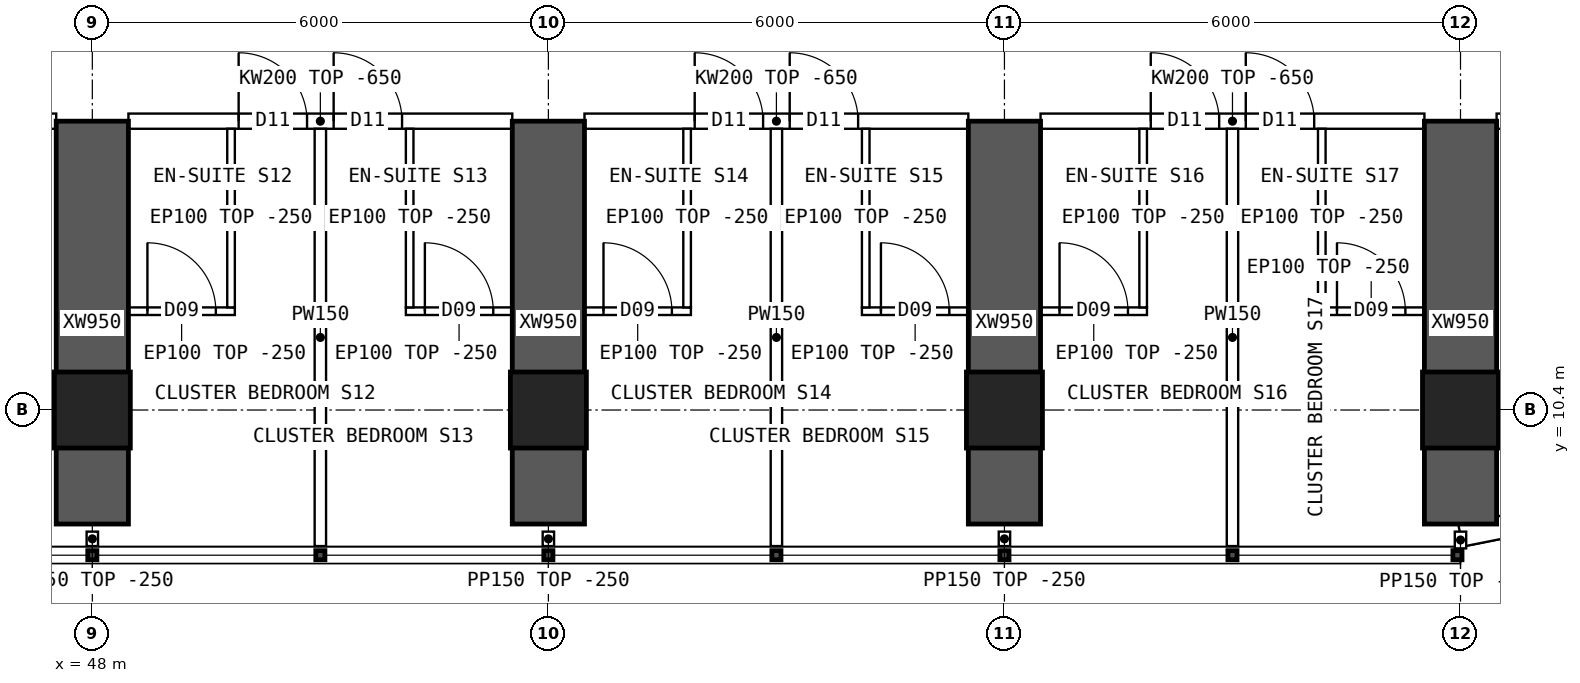
"""IFC4 building model, lengths in metres.
Left out: names, types, materials, properties, quantities, classifications, styles, units other than length and angle.
Written with IfcOpenShell. Run it as: python <this file> out.ifc"""

import sys

from ifc_helpers import new_model, si_unit, direction, frame, frame_2d, origin, origin_2d, place, context, subcontext, project, spatial, polyline, rectangle, hollow_rectangle, outline, extrude, element, fill, save


model = new_model("IFC4")
c1 = context("Model", 3, precision=1e-05, world=origin(), true_north=direction((0.0, 1.0)))
c2 = subcontext(c1, "Body", "Model", "MODEL_VIEW")
j1 = project(units=[si_unit("LENGTHUNIT", "METRE"), si_unit("PLANEANGLEUNIT", "RADIAN")], contexts=[c1])
p1 = place(None, origin())
s1 = spatial("IfcSite", under=j1, at=p1, CompositionType="ELEMENT")
p2 = place(p1, origin())
s2 = spatial("IfcBuilding", under=s1, at=p2, CompositionType="ELEMENT")
p3 = place(p2, frame((0.0, 0.0, 84.4)))
s3 = spatial("IfcBuildingStorey", under=s2, at=p3, CompositionType="ELEMENT", Elevation=84.4)
for number, where, z_axis, x_axis in (
    (1, (48.0, 10.4, 0.0), (0.0, 0.0, 1.0), (1.0, 0.0, 0.0)),
    (2, (54.0, 10.4, 0.0), (0.0, 0.0, 1.0), (1.0, 0.0, 0.0)),
    (3, (60.0, 10.4, 0.0), (0.0, 0.0, 1.0), (1.0, 0.0, 0.0)),
    (4, (66.0, 10.4, 0.0), (0.0, 0.0, 1.0), (1.0, 0.0, 0.0)),
):
    element("IfcColumn", number, at=place(p3, frame(where, z_axis=z_axis, x_axis=x_axis)), inside=s3, PredefinedType="COLUMN", context=c2, shape_type="SweptSolid", body=[
        extrude(hollow_rectangle(XDim=1.0, YDim=1.0, WallThickness=0.1, at=origin_2d()), origin(), (0.0, 0.0, 1.0), 3.75),
    ])
for number, where, z_axis, x_axis in (
    (5, (48.0, 8.9, 0.0), (0.0, 0.0, 1.0), (0.0, 1.0, 0.0)),
    (6, (54.0, 8.9, 0.0), (0.0, 0.0, 1.0), (0.0, 1.0, 0.0)),
    (7, (60.0, 8.9, 0.0), (0.0, 0.0, 1.0), (0.0, 1.0, 0.0)),
    (8, (66.0, 8.9, 0.0), (0.0, 0.0, 1.0), (0.0, 1.0, 0.0)),
):
    element("IfcWall", number, at=place(p3, frame(where, z_axis=z_axis, x_axis=x_axis)), inside=s3, PredefinedType="SHEAR", context=c2, shape_type="SweptSolid", body=[
        extrude(rectangle(XDim=5.3, YDim=0.95, at=frame_2d((2.65, 0.0))), origin(), (0.0, 0.0, 1.0), 3.75),
    ])
p4 = place(p3, frame((66.0, 8.75, 0.0), z_axis=(0.0, 0.0, 1.0), x_axis=(0.980791473772, 0.195059183267, 0.0)))
e9 = element("IfcWall", 9, at=p4, inside=s3, PredefinedType="SOLIDWALL", context=c2, shape_type="SweptSolid", body=[
    extrude(outline(polyline([(-0.03, -0.15), (3.717, -0.15), (3.657, 0.15), (0.03, 0.15), (-0.03, -0.15)])), origin(), (0.0, 0.0, 1.0), 3.5),
])
p5 = place(p4, frame((1.144, 0.0, 0.9)))
e10 = element("IfcOpeningElement", 10, at=p5, cuts=e9, PredefinedType="OPENING", context=c2, shape_type="SweptSolid", body=[
    extrude(rectangle(XDim=1.4, YDim=1.8, at=frame_2d((0.7, 0.9))), frame((0.0, 0.16, 0.0), z_axis=(0.0, -1.0, 0.0), x_axis=(1.0, 0.0, 0.0)), (0.0, 0.0, 1.0), 0.32),
])
p6 = place(p3, frame((42.475, 14.2, 0.0), z_axis=(0.0, 0.0, 1.0), x_axis=(1.0, 0.0, 0.0)))
e11 = element("IfcWall", 11, at=p6, inside=s3, PredefinedType="SOLIDWALL", context=c2, shape_type="SweptSolid", body=[
    extrude(outline(polyline([(0.0, 0.0), (5.05, 0.0), (5.05, 3.1), (0.0, 3.1), (0.0, 0.0)])), frame((0.0, 0.1, 0.0), z_axis=(0.0, -1.0, 0.0), x_axis=(1.0, 0.0, 0.0)), (0.0, 0.0, 1.0), 0.2),
])
p7 = place(p6, frame((0.6, 0.0, 0.0)))
e12 = element("IfcOpeningElement", 12, at=p7, cuts=e11, PredefinedType="OPENING", context=c2, shape_type="SweptSolid", body=[
    extrude(rectangle(XDim=1.0, YDim=2.1, at=frame_2d((0.5, 1.05))), frame((0.0, 0.11, 0.0), z_axis=(0.0, -1.0, 0.0), x_axis=(1.0, 0.0, 0.0)), (0.0, 0.0, 1.0), 0.22),
])
p8 = place(p3, frame((48.475, 14.2, 0.0), z_axis=(0.0, 0.0, 1.0), x_axis=(1.0, 0.0, 0.0)))
e13 = element("IfcWall", 13, at=p8, inside=s3, PredefinedType="SOLIDWALL", context=c2, shape_type="SweptSolid", body=[
    extrude(outline(polyline([(0.0, 0.0), (5.05, 0.0), (5.05, 3.1), (0.0, 3.1), (0.0, 0.0)])), frame((0.0, 0.1, 0.0), z_axis=(0.0, -1.0, 0.0), x_axis=(1.0, 0.0, 0.0)), (0.0, 0.0, 1.0), 0.2),
])
p9 = place(p8, frame((1.45, 0.0, 0.0)))
e14 = element("IfcOpeningElement", 14, at=p9, cuts=e13, PredefinedType="OPENING", context=c2, shape_type="SweptSolid", body=[
    extrude(rectangle(XDim=0.9, YDim=2.1, at=frame_2d((0.45, 1.05))), frame((0.0, 0.11, 0.0), z_axis=(0.0, -1.0, 0.0), x_axis=(1.0, 0.0, 0.0)), (0.0, 0.0, 1.0), 0.22),
])
p10 = place(p8, frame((2.7, 0.0, 0.0)))
e15 = element("IfcOpeningElement", 15, at=p10, cuts=e13, PredefinedType="OPENING", context=c2, shape_type="SweptSolid", body=[
    extrude(rectangle(XDim=0.9, YDim=2.1, at=frame_2d((0.45, 1.05))), frame((0.0, 0.11, 0.0), z_axis=(0.0, -1.0, 0.0), x_axis=(1.0, 0.0, 0.0)), (0.0, 0.0, 1.0), 0.22),
])
p11 = place(p3, frame((54.475, 14.2, 0.0), z_axis=(0.0, 0.0, 1.0), x_axis=(1.0, 0.0, 0.0)))
e16 = element("IfcWall", 16, at=p11, inside=s3, PredefinedType="SOLIDWALL", context=c2, shape_type="SweptSolid", body=[
    extrude(outline(polyline([(0.0, 0.0), (5.05, 0.0), (5.05, 3.1), (0.0, 3.1), (0.0, 0.0)])), frame((0.0, 0.1, 0.0), z_axis=(0.0, -1.0, 0.0), x_axis=(1.0, 0.0, 0.0)), (0.0, 0.0, 1.0), 0.2),
])
p12 = place(p11, frame((1.45, 0.0, 0.0)))
e17 = element("IfcOpeningElement", 17, at=p12, cuts=e16, PredefinedType="OPENING", context=c2, shape_type="SweptSolid", body=[
    extrude(rectangle(XDim=0.9, YDim=2.1, at=frame_2d((0.45, 1.05))), frame((0.0, 0.11, 0.0), z_axis=(0.0, -1.0, 0.0), x_axis=(1.0, 0.0, 0.0)), (0.0, 0.0, 1.0), 0.22),
])
p13 = place(p11, frame((2.7, 0.0, 0.0)))
e18 = element("IfcOpeningElement", 18, at=p13, cuts=e16, PredefinedType="OPENING", context=c2, shape_type="SweptSolid", body=[
    extrude(rectangle(XDim=0.9, YDim=2.1, at=frame_2d((0.45, 1.05))), frame((0.0, 0.11, 0.0), z_axis=(0.0, -1.0, 0.0), x_axis=(1.0, 0.0, 0.0)), (0.0, 0.0, 1.0), 0.22),
])
p14 = place(p3, frame((60.475, 14.2, 0.0), z_axis=(0.0, 0.0, 1.0), x_axis=(1.0, 0.0, 0.0)))
e19 = element("IfcWall", 19, at=p14, inside=s3, PredefinedType="SOLIDWALL", context=c2, shape_type="SweptSolid", body=[
    extrude(outline(polyline([(0.0, 0.0), (5.05, 0.0), (5.05, 3.1), (0.0, 3.1), (0.0, 0.0)])), frame((0.0, 0.1, 0.0), z_axis=(0.0, -1.0, 0.0), x_axis=(1.0, 0.0, 0.0)), (0.0, 0.0, 1.0), 0.2),
])
p15 = place(p14, frame((1.45, 0.0, 0.0)))
e20 = element("IfcOpeningElement", 20, at=p15, cuts=e19, PredefinedType="OPENING", context=c2, shape_type="SweptSolid", body=[
    extrude(rectangle(XDim=0.9, YDim=2.1, at=frame_2d((0.45, 1.05))), frame((0.0, 0.11, 0.0), z_axis=(0.0, -1.0, 0.0), x_axis=(1.0, 0.0, 0.0)), (0.0, 0.0, 1.0), 0.22),
])
p16 = place(p14, frame((2.7, 0.0, 0.0)))
e21 = element("IfcOpeningElement", 21, at=p16, cuts=e19, PredefinedType="OPENING", context=c2, shape_type="SweptSolid", body=[
    extrude(rectangle(XDim=0.9, YDim=2.1, at=frame_2d((0.45, 1.05))), frame((0.0, 0.11, 0.0), z_axis=(0.0, -1.0, 0.0), x_axis=(1.0, 0.0, 0.0)), (0.0, 0.0, 1.0), 0.22),
])
p17 = place(p3, frame((66.475, 14.2, 0.0), z_axis=(0.0, 0.0, 1.0), x_axis=(1.0, 0.0, 0.0)))
e22 = element("IfcWall", 22, at=p17, inside=s3, PredefinedType="SOLIDWALL", context=c2, shape_type="SweptSolid", body=[
    extrude(rectangle(XDim=1.925, YDim=0.2, at=frame_2d((0.962, 0.0))), origin(), (0.0, 0.0, 1.0), 3.5),
])
p18 = place(p17, frame((0.2, 0.0, 0.0)))
e23 = element("IfcOpeningElement", 23, at=p18, cuts=e22, PredefinedType="OPENING", context=c2, shape_type="SweptSolid", body=[
    extrude(rectangle(XDim=0.9, YDim=2.1, at=frame_2d((0.45, 1.05))), frame((0.0, 0.11, 0.0), z_axis=(0.0, -1.0, 0.0), x_axis=(1.0, 0.0, 0.0)), (0.0, 0.0, 1.0), 0.22),
])
p19 = place(p3, frame((51.0, 8.61, 0.0), z_axis=(0.0, 0.0, 1.0), x_axis=(0.0, 1.0, 0.0)))
e24 = element("IfcWall", 24, at=p19, inside=s3, PredefinedType="PARTITIONING", context=c2, shape_type="SweptSolid", body=[
    extrude(outline(polyline([(0.0, 0.0), (5.49, 0.0), (5.49, 3.1), (5.442, 3.1), (5.44, 3.5), (1.992, 3.5), (1.99, 3.1), (1.592, 3.1), (1.59, 3.5), (0.0, 3.5), (0.0, 0.0)])), frame((0.0, 0.075, 0.0), z_axis=(0.0, -1.0, 0.0), x_axis=(1.0, 0.0, 0.0)), (0.0, 0.0, 1.0), 0.15),
])
p20 = place(p3, frame((49.875, 11.7, 0.0), z_axis=(0.0, 0.0, 1.0), x_axis=(-1.0, 0.0, 0.0)))
e25 = element("IfcWall", 25, at=p20, inside=s3, PredefinedType="PARTITIONING", context=c2, shape_type="SweptSolid", body=[
    extrude(rectangle(XDim=1.4, YDim=0.1, at=frame_2d((0.7, 0.0))), origin(), (0.0, 0.0, 1.0), 3.5),
])
p21 = place(p20, frame((0.25, 0.0, 0.0)))
e26 = element("IfcOpeningElement", 26, at=p21, cuts=e25, PredefinedType="OPENING", context=c2, shape_type="SweptSolid", body=[
    extrude(rectangle(XDim=0.9, YDim=2.1, at=frame_2d((0.45, 1.05))), frame((0.0, 0.06, 0.0), z_axis=(0.0, -1.0, 0.0), x_axis=(1.0, 0.0, 0.0)), (0.0, 0.0, 1.0), 0.12),
])
p22 = place(p3, frame((49.825, 11.75, 0.0), z_axis=(0.0, 0.0, 1.0), x_axis=(0.0, 1.0, 0.0)))
e27 = element("IfcWall", 27, at=p22, inside=s3, PredefinedType="PARTITIONING", context=c2, shape_type="SweptSolid", body=[
    extrude(outline(polyline([(0.0, 0.0), (2.35, 0.0), (2.35, 3.1), (2.302, 3.1), (2.3, 3.5), (0.0, 3.5), (0.0, 0.0)])), frame((0.0, 0.05, 0.0), z_axis=(0.0, -1.0, 0.0), x_axis=(1.0, 0.0, 0.0)), (0.0, 0.0, 1.0), 0.1),
])
p23 = place(p3, frame((53.525, 11.7, 0.0), z_axis=(0.0, 0.0, 1.0), x_axis=(-1.0, 0.0, 0.0)))
e28 = element("IfcWall", 28, at=p23, inside=s3, PredefinedType="PARTITIONING", context=c2, shape_type="SweptSolid", body=[
    extrude(rectangle(XDim=1.4, YDim=0.1, at=frame_2d((0.7, 0.0))), origin(), (0.0, 0.0, 1.0), 3.5),
])
p24 = place(p23, frame((0.25, 0.0, 0.0)))
e29 = element("IfcOpeningElement", 29, at=p24, cuts=e28, PredefinedType="OPENING", context=c2, shape_type="SweptSolid", body=[
    extrude(rectangle(XDim=0.9, YDim=2.1, at=frame_2d((0.45, 1.05))), frame((0.0, 0.06, 0.0), z_axis=(0.0, -1.0, 0.0), x_axis=(1.0, 0.0, 0.0)), (0.0, 0.0, 1.0), 0.12),
])
p25 = place(p3, frame((52.175, 11.75, 0.0), z_axis=(0.0, 0.0, 1.0), x_axis=(0.0, 1.0, 0.0)))
e30 = element("IfcWall", 30, at=p25, inside=s3, PredefinedType="PARTITIONING", context=c2, shape_type="SweptSolid", body=[
    extrude(outline(polyline([(0.0, 0.0), (2.35, 0.0), (2.35, 3.1), (2.302, 3.1), (2.3, 3.5), (0.0, 3.5), (0.0, 0.0)])), frame((0.0, 0.05, 0.0), z_axis=(0.0, -1.0, 0.0), x_axis=(1.0, 0.0, 0.0)), (0.0, 0.0, 1.0), 0.1),
])
p26 = place(p3, frame((57.0, 8.61, 0.0), z_axis=(0.0, 0.0, 1.0), x_axis=(0.0, 1.0, 0.0)))
e31 = element("IfcWall", 31, at=p26, inside=s3, PredefinedType="PARTITIONING", context=c2, shape_type="SweptSolid", body=[
    extrude(outline(polyline([(0.0, 0.0), (5.49, 0.0), (5.49, 3.1), (5.442, 3.1), (5.44, 3.5), (1.992, 3.5), (1.99, 3.1), (1.592, 3.1), (1.59, 3.5), (0.0, 3.5), (0.0, 0.0)])), frame((0.0, 0.075, 0.0), z_axis=(0.0, -1.0, 0.0), x_axis=(1.0, 0.0, 0.0)), (0.0, 0.0, 1.0), 0.15),
])
p27 = place(p3, frame((55.875, 11.7, 0.0), z_axis=(0.0, 0.0, 1.0), x_axis=(-1.0, 0.0, 0.0)))
e32 = element("IfcWall", 32, at=p27, inside=s3, PredefinedType="PARTITIONING", context=c2, shape_type="SweptSolid", body=[
    extrude(rectangle(XDim=1.4, YDim=0.1, at=frame_2d((0.7, 0.0))), origin(), (0.0, 0.0, 1.0), 3.5),
])
p28 = place(p27, frame((0.25, 0.0, 0.0)))
e33 = element("IfcOpeningElement", 33, at=p28, cuts=e32, PredefinedType="OPENING", context=c2, shape_type="SweptSolid", body=[
    extrude(rectangle(XDim=0.9, YDim=2.1, at=frame_2d((0.45, 1.05))), frame((0.0, 0.06, 0.0), z_axis=(0.0, -1.0, 0.0), x_axis=(1.0, 0.0, 0.0)), (0.0, 0.0, 1.0), 0.12),
])
p29 = place(p3, frame((55.825, 11.75, 0.0), z_axis=(0.0, 0.0, 1.0), x_axis=(0.0, 1.0, 0.0)))
e34 = element("IfcWall", 34, at=p29, inside=s3, PredefinedType="PARTITIONING", context=c2, shape_type="SweptSolid", body=[
    extrude(outline(polyline([(0.0, 0.0), (2.35, 0.0), (2.35, 3.1), (2.302, 3.1), (2.3, 3.5), (0.0, 3.5), (0.0, 0.0)])), frame((0.0, 0.05, 0.0), z_axis=(0.0, -1.0, 0.0), x_axis=(1.0, 0.0, 0.0)), (0.0, 0.0, 1.0), 0.1),
])
p30 = place(p3, frame((59.525, 11.7, 0.0), z_axis=(0.0, 0.0, 1.0), x_axis=(-1.0, 0.0, 0.0)))
e35 = element("IfcWall", 35, at=p30, inside=s3, PredefinedType="PARTITIONING", context=c2, shape_type="SweptSolid", body=[
    extrude(rectangle(XDim=1.4, YDim=0.1, at=frame_2d((0.7, 0.0))), origin(), (0.0, 0.0, 1.0), 3.5),
])
p31 = place(p30, frame((0.25, 0.0, 0.0)))
e36 = element("IfcOpeningElement", 36, at=p31, cuts=e35, PredefinedType="OPENING", context=c2, shape_type="SweptSolid", body=[
    extrude(rectangle(XDim=0.9, YDim=2.1, at=frame_2d((0.45, 1.05))), frame((0.0, 0.06, 0.0), z_axis=(0.0, -1.0, 0.0), x_axis=(1.0, 0.0, 0.0)), (0.0, 0.0, 1.0), 0.12),
])
p32 = place(p3, frame((58.175, 11.75, 0.0), z_axis=(0.0, 0.0, 1.0), x_axis=(0.0, 1.0, 0.0)))
e37 = element("IfcWall", 37, at=p32, inside=s3, PredefinedType="PARTITIONING", context=c2, shape_type="SweptSolid", body=[
    extrude(outline(polyline([(0.0, 0.0), (2.35, 0.0), (2.35, 3.1), (2.302, 3.1), (2.3, 3.5), (0.0, 3.5), (0.0, 0.0)])), frame((0.0, 0.05, 0.0), z_axis=(0.0, -1.0, 0.0), x_axis=(1.0, 0.0, 0.0)), (0.0, 0.0, 1.0), 0.1),
])
p33 = place(p3, frame((63.0, 8.61, 0.0), z_axis=(0.0, 0.0, 1.0), x_axis=(0.0, 1.0, 0.0)))
e38 = element("IfcWall", 38, at=p33, inside=s3, PredefinedType="PARTITIONING", context=c2, shape_type="SweptSolid", body=[
    extrude(outline(polyline([(0.0, 0.0), (5.49, 0.0), (5.49, 3.1), (5.442, 3.1), (5.44, 3.5), (1.992, 3.5), (1.99, 3.1), (1.592, 3.1), (1.59, 3.5), (0.0, 3.5), (0.0, 0.0)])), frame((0.0, 0.075, 0.0), z_axis=(0.0, -1.0, 0.0), x_axis=(1.0, 0.0, 0.0)), (0.0, 0.0, 1.0), 0.15),
])
p34 = place(p3, frame((61.875, 11.7, 0.0), z_axis=(0.0, 0.0, 1.0), x_axis=(-1.0, 0.0, 0.0)))
e39 = element("IfcWall", 39, at=p34, inside=s3, PredefinedType="PARTITIONING", context=c2, shape_type="SweptSolid", body=[
    extrude(rectangle(XDim=1.4, YDim=0.1, at=frame_2d((0.7, 0.0))), origin(), (0.0, 0.0, 1.0), 3.5),
])
p35 = place(p34, frame((0.25, 0.0, 0.0)))
e40 = element("IfcOpeningElement", 40, at=p35, cuts=e39, PredefinedType="OPENING", context=c2, shape_type="SweptSolid", body=[
    extrude(rectangle(XDim=0.9, YDim=2.1, at=frame_2d((0.45, 1.05))), frame((0.0, 0.06, 0.0), z_axis=(0.0, -1.0, 0.0), x_axis=(1.0, 0.0, 0.0)), (0.0, 0.0, 1.0), 0.12),
])
p36 = place(p3, frame((61.825, 11.75, 0.0), z_axis=(0.0, 0.0, 1.0), x_axis=(0.0, 1.0, 0.0)))
e41 = element("IfcWall", 41, at=p36, inside=s3, PredefinedType="PARTITIONING", context=c2, shape_type="SweptSolid", body=[
    extrude(outline(polyline([(0.0, 0.0), (2.35, 0.0), (2.35, 3.1), (2.302, 3.1), (2.3, 3.5), (0.0, 3.5), (0.0, 0.0)])), frame((0.0, 0.05, 0.0), z_axis=(0.0, -1.0, 0.0), x_axis=(1.0, 0.0, 0.0)), (0.0, 0.0, 1.0), 0.1),
])
p37 = place(p3, frame((65.525, 11.7, 0.0), z_axis=(0.0, 0.0, 1.0), x_axis=(-1.0, 0.0, 0.0)))
e42 = element("IfcWall", 42, at=p37, inside=s3, PredefinedType="PARTITIONING", context=c2, shape_type="SweptSolid", body=[
    extrude(rectangle(XDim=1.4, YDim=0.1, at=frame_2d((0.7, 0.0))), origin(), (0.0, 0.0, 1.0), 3.5),
])
p38 = place(p37, frame((0.25, 0.0, 0.0)))
e43 = element("IfcOpeningElement", 43, at=p38, cuts=e42, PredefinedType="OPENING", context=c2, shape_type="SweptSolid", body=[
    extrude(rectangle(XDim=0.9, YDim=2.1, at=frame_2d((0.45, 1.05))), frame((0.0, 0.06, 0.0), z_axis=(0.0, -1.0, 0.0), x_axis=(1.0, 0.0, 0.0)), (0.0, 0.0, 1.0), 0.12),
])
p39 = place(p3, frame((64.175, 11.75, 0.0), z_axis=(0.0, 0.0, 1.0), x_axis=(0.0, 1.0, 0.0)))
e44 = element("IfcWall", 44, at=p39, inside=s3, PredefinedType="PARTITIONING", context=c2, shape_type="SweptSolid", body=[
    extrude(outline(polyline([(0.0, 0.0), (2.35, 0.0), (2.35, 3.1), (2.302, 3.1), (2.3, 3.5), (0.0, 3.5), (0.0, 0.0)])), frame((0.0, 0.05, 0.0), z_axis=(0.0, -1.0, 0.0), x_axis=(1.0, 0.0, 0.0)), (0.0, 0.0, 1.0), 0.1),
])
for number, where, z_axis, x_axis in (
    (45, (48.0, 8.8, 0.0), (0.0, 0.0, 1.0), (0.0, -1.0, 0.0)),
    (46, (54.0, 8.8, 0.0), (0.0, 0.0, 1.0), (0.0, -1.0, 0.0)),
    (47, (60.0, 8.8, 0.0), (0.0, 0.0, 1.0), (0.0, -1.0, 0.0)),
):
    element("IfcWall", number, at=place(p3, frame(where, z_axis=z_axis, x_axis=x_axis)), inside=s3, PredefinedType="PARTITIONING", context=c2, shape_type="SweptSolid", body=[
        extrude(rectangle(XDim=0.19, YDim=0.15, at=frame_2d((0.095, 0.0))), origin(), (0.0, 0.0, 1.0), 3.5),
    ])
p40 = place(p3, frame((66.0, 8.8, 0.0), z_axis=(0.0, 0.0, 1.0), x_axis=(0.0, -1.0, 0.0)))
e48 = element("IfcWall", 48, at=p40, inside=s3, PredefinedType="PARTITIONING", context=c2, shape_type="SweptSolid", body=[
    extrude(rectangle(XDim=0.22, YDim=0.15, at=frame_2d((0.11, 0.0))), origin(), (0.0, 0.0, 1.0), 3.5),
])
p41 = place(p21, origin())
e49 = element("IfcDoor", 49, at=p41, inside=s3, OperationType="SINGLE_SWING_RIGHT", PredefinedType="DOOR", context=c2, shape_type="SweptSolid", body=[
    extrude(rectangle(XDim=0.9, YDim=2.1, at=frame_2d((0.45, 1.05))), frame((0.0, 0.025, 0.0), z_axis=(0.0, -1.0, 0.0), x_axis=(1.0, 0.0, 0.0)), (0.0, 0.0, 1.0), 0.05),
])
fill(e26, e49)
p42 = place(p9, origin())
e50 = element("IfcDoor", 50, at=p42, inside=s3, OperationType="SINGLE_SWING_LEFT", PredefinedType="DOOR", context=c2, shape_type="SweptSolid", body=[
    extrude(rectangle(XDim=0.9, YDim=2.1, at=frame_2d((0.45, 1.05))), frame((0.0, 0.025, 0.0), z_axis=(0.0, -1.0, 0.0), x_axis=(1.0, 0.0, 0.0)), (0.0, 0.0, 1.0), 0.05),
])
fill(e14, e50)
p43 = place(p24, origin())
e51 = element("IfcDoor", 51, at=p43, inside=s3, OperationType="SINGLE_SWING_RIGHT", PredefinedType="DOOR", context=c2, shape_type="SweptSolid", body=[
    extrude(rectangle(XDim=0.9, YDim=2.1, at=frame_2d((0.45, 1.05))), frame((0.0, 0.025, 0.0), z_axis=(0.0, -1.0, 0.0), x_axis=(1.0, 0.0, 0.0)), (0.0, 0.0, 1.0), 0.05),
])
fill(e29, e51)
p44 = place(p10, origin())
e52 = element("IfcDoor", 52, at=p44, inside=s3, OperationType="SINGLE_SWING_LEFT", PredefinedType="DOOR", context=c2, shape_type="SweptSolid", body=[
    extrude(rectangle(XDim=0.9, YDim=2.1, at=frame_2d((0.45, 1.05))), frame((0.0, 0.025, 0.0), z_axis=(0.0, -1.0, 0.0), x_axis=(1.0, 0.0, 0.0)), (0.0, 0.0, 1.0), 0.05),
])
fill(e15, e52)
p45 = place(p28, origin())
e53 = element("IfcDoor", 53, at=p45, inside=s3, OperationType="SINGLE_SWING_RIGHT", PredefinedType="DOOR", context=c2, shape_type="SweptSolid", body=[
    extrude(rectangle(XDim=0.9, YDim=2.1, at=frame_2d((0.45, 1.05))), frame((0.0, 0.025, 0.0), z_axis=(0.0, -1.0, 0.0), x_axis=(1.0, 0.0, 0.0)), (0.0, 0.0, 1.0), 0.05),
])
fill(e33, e53)
p46 = place(p12, origin())
e54 = element("IfcDoor", 54, at=p46, inside=s3, OperationType="SINGLE_SWING_LEFT", PredefinedType="DOOR", context=c2, shape_type="SweptSolid", body=[
    extrude(rectangle(XDim=0.9, YDim=2.1, at=frame_2d((0.45, 1.05))), frame((0.0, 0.025, 0.0), z_axis=(0.0, -1.0, 0.0), x_axis=(1.0, 0.0, 0.0)), (0.0, 0.0, 1.0), 0.05),
])
fill(e17, e54)
p47 = place(p31, origin())
e55 = element("IfcDoor", 55, at=p47, inside=s3, OperationType="SINGLE_SWING_RIGHT", PredefinedType="DOOR", context=c2, shape_type="SweptSolid", body=[
    extrude(rectangle(XDim=0.9, YDim=2.1, at=frame_2d((0.45, 1.05))), frame((0.0, 0.025, 0.0), z_axis=(0.0, -1.0, 0.0), x_axis=(1.0, 0.0, 0.0)), (0.0, 0.0, 1.0), 0.05),
])
fill(e36, e55)
p48 = place(p13, origin())
e56 = element("IfcDoor", 56, at=p48, inside=s3, OperationType="SINGLE_SWING_LEFT", PredefinedType="DOOR", context=c2, shape_type="SweptSolid", body=[
    extrude(rectangle(XDim=0.9, YDim=2.1, at=frame_2d((0.45, 1.05))), frame((0.0, 0.025, 0.0), z_axis=(0.0, -1.0, 0.0), x_axis=(1.0, 0.0, 0.0)), (0.0, 0.0, 1.0), 0.05),
])
fill(e18, e56)
p49 = place(p35, origin())
e57 = element("IfcDoor", 57, at=p49, inside=s3, OperationType="SINGLE_SWING_RIGHT", PredefinedType="DOOR", context=c2, shape_type="SweptSolid", body=[
    extrude(rectangle(XDim=0.9, YDim=2.1, at=frame_2d((0.45, 1.05))), frame((0.0, 0.025, 0.0), z_axis=(0.0, -1.0, 0.0), x_axis=(1.0, 0.0, 0.0)), (0.0, 0.0, 1.0), 0.05),
])
fill(e40, e57)
p50 = place(p15, origin())
e58 = element("IfcDoor", 58, at=p50, inside=s3, OperationType="SINGLE_SWING_LEFT", PredefinedType="DOOR", context=c2, shape_type="SweptSolid", body=[
    extrude(rectangle(XDim=0.9, YDim=2.1, at=frame_2d((0.45, 1.05))), frame((0.0, 0.025, 0.0), z_axis=(0.0, -1.0, 0.0), x_axis=(1.0, 0.0, 0.0)), (0.0, 0.0, 1.0), 0.05),
])
fill(e20, e58)
p51 = place(p38, origin())
e59 = element("IfcDoor", 59, at=p51, inside=s3, OperationType="SINGLE_SWING_RIGHT", PredefinedType="DOOR", context=c2, shape_type="SweptSolid", body=[
    extrude(rectangle(XDim=0.9, YDim=2.1, at=frame_2d((0.45, 1.05))), frame((0.0, 0.025, 0.0), z_axis=(0.0, -1.0, 0.0), x_axis=(1.0, 0.0, 0.0)), (0.0, 0.0, 1.0), 0.05),
])
fill(e43, e59)
p52 = place(p16, origin())
e60 = element("IfcDoor", 60, at=p52, inside=s3, OperationType="SINGLE_SWING_LEFT", PredefinedType="DOOR", context=c2, shape_type="SweptSolid", body=[
    extrude(rectangle(XDim=0.9, YDim=2.1, at=frame_2d((0.45, 1.05))), frame((0.0, 0.025, 0.0), z_axis=(0.0, -1.0, 0.0), x_axis=(1.0, 0.0, 0.0)), (0.0, 0.0, 1.0), 0.05),
])
fill(e21, e60)
save(model, sys.argv[1])
